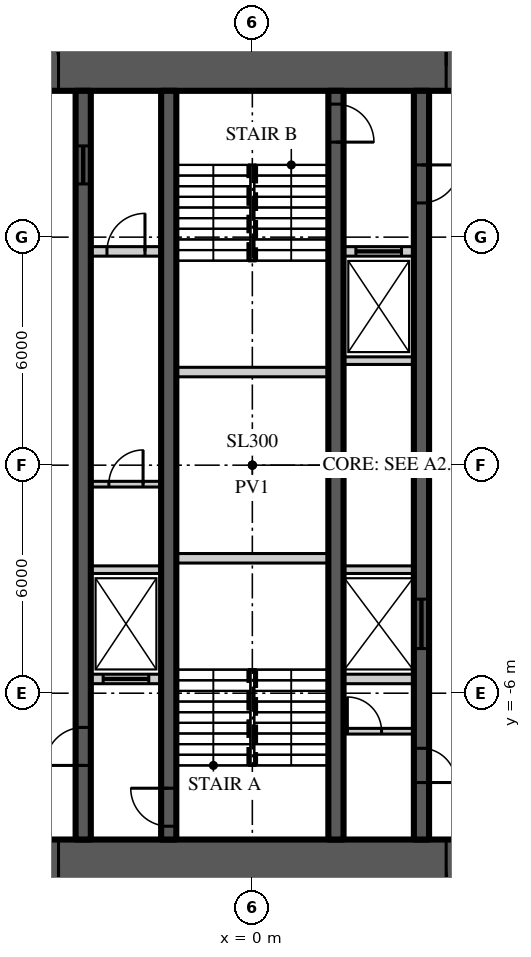
"""IFC4 building model, lengths in metres.
Left out: names, types, materials, properties, quantities, classifications, styles, units other than length and angle.
Written with IfcOpenShell. Run it as: python <this file> out.ifc"""

import sys

from ifc_helpers import new_model, si_unit, direction, frame, frame_2d, origin, place, context, subcontext, project, spatial, rectangle, extrude, element, fill, save


model = new_model("IFC4")
c1 = context("Model", 3, precision=1e-05, world=origin(), true_north=direction((0.0, 1.0)))
c2 = subcontext(c1, "Body", "Model", "MODEL_VIEW")
j1 = project(units=[si_unit("LENGTHUNIT", "METRE"), si_unit("PLANEANGLEUNIT", "RADIAN")], contexts=[c1])
p1 = place(None, origin())
s1 = spatial("IfcSite", under=j1, at=p1, CompositionType="ELEMENT")
p2 = place(p1, origin())
s2 = spatial("IfcBuilding", under=s1, at=p2, CompositionType="ELEMENT")
p3 = place(p2, origin())
s3 = spatial("IfcBuildingStorey", under=s2, at=p3, CompositionType="ELEMENT", Elevation=0.0)
p4 = place(p3, frame((-11.15, 10.5, 0.0), z_axis=(0.0, 0.0, 1.0), x_axis=(1.0, 0.0, 0.0)))
e1 = element("IfcWall", 1, at=p4, inside=s3, PredefinedType="SHEAR", context=c2, shape_type="SweptSolid", body=[
    extrude(rectangle(XDim=22.3, YDim=1.3, at=frame_2d((11.15, 0.0))), origin(), (0.0, 0.0, 1.0), 7.0),
])
p5 = place(p4, frame((4.25, 0.0, 0.0)))
e2 = element("IfcOpeningElement", 2, at=p5, cuts=e1, PredefinedType="OPENING", context=c2, shape_type="SweptSolid", body=[
    extrude(rectangle(XDim=1.8, YDim=2.2, at=frame_2d((0.9, 1.1))), frame((0.0, 0.66, 0.0), z_axis=(0.0, -1.0, 0.0), x_axis=(1.0, 0.0, 0.0)), (0.0, 0.0, 1.0), 1.32),
])
p6 = place(p4, frame((16.25, 0.0, 0.0)))
e3 = element("IfcOpeningElement", 3, at=p6, cuts=e1, PredefinedType="OPENING", context=c2, shape_type="SweptSolid", body=[
    extrude(rectangle(XDim=1.8, YDim=2.2, at=frame_2d((0.9, 1.1))), frame((0.0, 0.66, 0.0), z_axis=(0.0, -1.0, 0.0), x_axis=(1.0, 0.0, 0.0)), (0.0, 0.0, 1.0), 1.32),
])
p7 = place(p3, frame((11.15, -10.5, 0.0), z_axis=(0.0, 0.0, 1.0), x_axis=(-1.0, 0.0, 0.0)))
e4 = element("IfcWall", 4, at=p7, inside=s3, PredefinedType="SHEAR", context=c2, shape_type="SweptSolid", body=[
    extrude(rectangle(XDim=22.3, YDim=1.3, at=frame_2d((11.15, 0.0))), origin(), (0.0, 0.0, 1.0), 7.0),
])
p8 = place(p7, frame((16.25, 0.0, 0.0)))
e5 = element("IfcOpeningElement", 5, at=p8, cuts=e4, PredefinedType="OPENING", context=c2, shape_type="SweptSolid", body=[
    extrude(rectangle(XDim=1.8, YDim=2.2, at=frame_2d((0.9, 1.1))), frame((0.0, 0.66, 0.0), z_axis=(0.0, -1.0, 0.0), x_axis=(1.0, 0.0, 0.0)), (0.0, 0.0, 1.0), 1.32),
])
p9 = place(p7, frame((4.25, 0.0, 0.0)))
e6 = element("IfcOpeningElement", 6, at=p9, cuts=e4, PredefinedType="OPENING", context=c2, shape_type="SweptSolid", body=[
    extrude(rectangle(XDim=1.8, YDim=2.2, at=frame_2d((0.9, 1.1))), frame((0.0, 0.66, 0.0), z_axis=(0.0, -1.0, 0.0), x_axis=(1.0, 0.0, 0.0)), (0.0, 0.0, 1.0), 1.32),
])
p10 = place(p3, frame((-4.45, -9.85, 0.0), z_axis=(0.0, 0.0, 1.0), x_axis=(0.0, 1.0, 0.0)))
e7 = element("IfcWall", 7, at=p10, inside=s3, PredefinedType="SHEAR", context=c2, shape_type="SweptSolid", body=[
    extrude(rectangle(XDim=19.7, YDim=0.4, at=frame_2d((9.85, 0.0))), origin(), (0.0, 0.0, 1.0), 7.0),
])
p11 = place(p10, frame((1.95, 0.0, 0.0)))
e8 = element("IfcOpeningElement", 8, at=p11, cuts=e7, PredefinedType="OPENING", context=c2, shape_type="SweptSolid", body=[
    extrude(rectangle(XDim=1.0, YDim=2.2, at=frame_2d((0.5, 1.1))), frame((0.0, 0.21, 0.0), z_axis=(0.0, -1.0, 0.0), x_axis=(1.0, 0.0, 0.0)), (0.0, 0.0, 1.0), 0.42),
])
p12 = place(p10, frame((17.25, 0.0, 0.0)))
e9 = element("IfcOpeningElement", 9, at=p12, cuts=e7, PredefinedType="OPENING", context=c2, shape_type="SweptSolid", body=[
    extrude(rectangle(XDim=1.0, YDim=2.1, at=frame_2d((0.5, 1.05))), frame((0.0, 0.21, 0.0), z_axis=(0.0, -1.0, 0.0), x_axis=(1.0, 0.0, 0.0)), (0.0, 0.0, 1.0), 0.42),
])
p13 = place(p3, frame((4.45, 9.85, 0.0), z_axis=(0.0, 0.0, 1.0), x_axis=(0.0, -1.0, 0.0)))
e10 = element("IfcWall", 10, at=p13, inside=s3, PredefinedType="SHEAR", context=c2, shape_type="SweptSolid", body=[
    extrude(rectangle(XDim=19.7, YDim=0.4, at=frame_2d((9.85, 0.0))), origin(), (0.0, 0.0, 1.0), 7.0),
])
p14 = place(p13, frame((1.95, 0.0, 0.0)))
e11 = element("IfcOpeningElement", 11, at=p14, cuts=e10, PredefinedType="OPENING", context=c2, shape_type="SweptSolid", body=[
    extrude(rectangle(XDim=1.0, YDim=2.2, at=frame_2d((0.5, 1.1))), frame((0.0, 0.21, 0.0), z_axis=(0.0, -1.0, 0.0), x_axis=(1.0, 0.0, 0.0)), (0.0, 0.0, 1.0), 0.42),
])
p15 = place(p13, frame((17.3, 0.0, 0.0)))
e12 = element("IfcOpeningElement", 12, at=p15, cuts=e10, PredefinedType="OPENING", context=c2, shape_type="SweptSolid", body=[
    extrude(rectangle(XDim=0.9, YDim=2.1, at=frame_2d((0.45, 1.05))), frame((0.0, 0.21, 0.0), z_axis=(0.0, -1.0, 0.0), x_axis=(1.0, 0.0, 0.0)), (0.0, 0.0, 1.0), 0.42),
])
p16 = place(p13, frame((13.375, 0.0, 0.0)))
e13 = element("IfcOpeningElement", 13, at=p16, cuts=e10, PredefinedType="OPENING", context=c2, shape_type="SweptSolid", body=[
    extrude(rectangle(XDim=1.3, YDim=2.2, at=frame_2d((0.65, 1.1))), frame((0.0, 0.21, 0.0), z_axis=(0.0, -1.0, 0.0), x_axis=(1.0, 0.0, 0.0)), (0.0, 0.0, 1.0), 0.42),
])
p17 = place(p3, frame((-2.2, -9.85, 0.0), z_axis=(0.0, 0.0, 1.0), x_axis=(0.0, 1.0, 0.0)))
e14 = element("IfcWall", 14, at=p17, inside=s3, PredefinedType="SHEAR", context=c2, shape_type="SweptSolid", body=[
    extrude(rectangle(XDim=19.7, YDim=0.4, at=frame_2d((9.85, 0.0))), origin(), (0.0, 0.0, 1.0), 7.0),
])
p18 = place(p17, frame((0.35, 0.0, 0.0)))
e15 = element("IfcOpeningElement", 15, at=p18, cuts=e14, PredefinedType="OPENING", context=c2, shape_type="SweptSolid", body=[
    extrude(rectangle(XDim=1.0, YDim=2.2, at=frame_2d((0.5, 1.1))), frame((0.0, 0.21, 0.0), z_axis=(0.0, -1.0, 0.0), x_axis=(1.0, 0.0, 0.0)), (0.0, 0.0, 1.0), 0.42),
])
p19 = place(p3, frame((2.2, 9.85, 0.0), z_axis=(0.0, 0.0, 1.0), x_axis=(0.0, -1.0, 0.0)))
e16 = element("IfcWall", 16, at=p19, inside=s3, PredefinedType="SHEAR", context=c2, shape_type="SweptSolid", body=[
    extrude(rectangle(XDim=19.7, YDim=0.4, at=frame_2d((9.85, 0.0))), origin(), (0.0, 0.0, 1.0), 7.0),
])
p20 = place(p19, frame((0.35, 0.0, 0.0)))
e17 = element("IfcOpeningElement", 17, at=p20, cuts=e16, PredefinedType="OPENING", context=c2, shape_type="SweptSolid", body=[
    extrude(rectangle(XDim=1.0, YDim=2.2, at=frame_2d((0.5, 1.1))), frame((0.0, 0.21, 0.0), z_axis=(0.0, -1.0, 0.0), x_axis=(1.0, 0.0, 0.0)), (0.0, 0.0, 1.0), 0.42),
])
p21 = place(p3, frame((-4.25, 5.625, 0.0), z_axis=(0.0, 0.0, 1.0), x_axis=(1.0, 0.0, 0.0)))
e18 = element("IfcWall", 18, at=p21, inside=s3, PredefinedType="SOLIDWALL", context=c2, shape_type="SweptSolid", body=[
    extrude(rectangle(XDim=1.85, YDim=0.25, at=frame_2d((0.925, 0.0))), origin(), (0.0, 0.0, 1.0), 6.8),
])
p22 = place(p21, frame((0.425, 0.0, 0.0)))
e19 = element("IfcOpeningElement", 19, at=p22, cuts=e18, PredefinedType="OPENING", context=c2, shape_type="SweptSolid", body=[
    extrude(rectangle(XDim=1.0, YDim=2.2, at=frame_2d((0.5, 1.1))), frame((0.0, 0.135, 0.0), z_axis=(0.0, -1.0, 0.0), x_axis=(1.0, 0.0, 0.0)), (0.0, 0.0, 1.0), 0.27),
])
p23 = place(p3, frame((2.4, 5.625, 0.0), z_axis=(0.0, 0.0, 1.0), x_axis=(1.0, 0.0, 0.0)))
e20 = element("IfcWall", 20, at=p23, inside=s3, PredefinedType="SOLIDWALL", context=c2, shape_type="SweptSolid", body=[
    extrude(rectangle(XDim=1.85, YDim=0.25, at=frame_2d((0.925, 0.0))), origin(), (0.0, 0.0, 1.0), 6.8),
])
p24 = place(p23, frame((0.325, 0.0, 0.0)))
e21 = element("IfcOpeningElement", 21, at=p24, cuts=e20, PredefinedType="OPENING", context=c2, shape_type="SweptSolid", body=[
    extrude(rectangle(XDim=1.2, YDim=2.2, at=frame_2d((0.6, 1.1))), frame((0.0, 0.135, 0.0), z_axis=(0.0, -1.0, 0.0), x_axis=(1.0, 0.0, 0.0)), (0.0, 0.0, 1.0), 0.27),
])
p25 = place(p3, frame((-4.25, -5.625, 0.0), z_axis=(0.0, 0.0, 1.0), x_axis=(1.0, 0.0, 0.0)))
e22 = element("IfcWall", 22, at=p25, inside=s3, PredefinedType="SOLIDWALL", context=c2, shape_type="SweptSolid", body=[
    extrude(rectangle(XDim=1.85, YDim=0.25, at=frame_2d((0.925, 0.0))), origin(), (0.0, 0.0, 1.0), 6.8),
])
p26 = place(p25, frame((0.325, 0.0, 0.0)))
e23 = element("IfcOpeningElement", 23, at=p26, cuts=e22, PredefinedType="OPENING", context=c2, shape_type="SweptSolid", body=[
    extrude(rectangle(XDim=1.2, YDim=2.2, at=frame_2d((0.6, 1.1))), frame((0.0, 0.135, 0.0), z_axis=(0.0, -1.0, 0.0), x_axis=(1.0, 0.0, 0.0)), (0.0, 0.0, 1.0), 0.27),
])
p27 = place(p3, frame((2.4, -5.625, 0.0), z_axis=(0.0, 0.0, 1.0), x_axis=(1.0, 0.0, 0.0)))
e24 = element("IfcWall", 24, at=p27, inside=s3, PredefinedType="SOLIDWALL", context=c2, shape_type="SweptSolid", body=[
    extrude(rectangle(XDim=1.85, YDim=0.25, at=frame_2d((0.925, 0.0))), origin(), (0.0, 0.0, 1.0), 6.8),
])
for number, where, z_axis, x_axis in (
    (25, (-2.0, -2.45, 0.0), (0.0, 0.0, 1.0), (1.0, 0.0, 0.0)),
    (26, (-2.0, 2.45, 0.0), (0.0, 0.0, 1.0), (1.0, 0.0, 0.0)),
):
    element("IfcWall", number, at=place(p3, frame(where, z_axis=z_axis, x_axis=x_axis)), inside=s3, PredefinedType="SOLIDWALL", context=c2, shape_type="SweptSolid", body=[
        extrude(rectangle(XDim=4.0, YDim=0.25, at=frame_2d((2.0, 0.0))), origin(), (0.0, 0.0, 1.0), 6.8),
    ])
for number, where, z_axis, x_axis in (
    (27, (-4.25, -2.75, 0.0), (0.0, 0.0, 1.0), (1.0, 0.0, 0.0)),
    (28, (2.4, -2.75, 0.0), (0.0, 0.0, 1.0), (1.0, 0.0, 0.0)),
    (29, (2.4, 2.75, 0.0), (0.0, 0.0, 1.0), (1.0, 0.0, 0.0)),
):
    element("IfcWall", number, at=place(p3, frame(where, z_axis=z_axis, x_axis=x_axis)), inside=s3, PredefinedType="SOLIDWALL", context=c2, shape_type="SweptSolid", body=[
        extrude(rectangle(XDim=1.85, YDim=0.2, at=frame_2d((0.925, 0.0))), origin(), (0.0, 0.0, 1.0), 6.8),
    ])
p28 = place(p3, frame((-4.25, -0.5, 0.0), z_axis=(0.0, 0.0, 1.0), x_axis=(1.0, 0.0, 0.0)))
e30 = element("IfcWall", 30, at=p28, inside=s3, PredefinedType="SOLIDWALL", context=c2, shape_type="SweptSolid", body=[
    extrude(rectangle(XDim=1.85, YDim=0.15, at=frame_2d((0.925, 0.0))), origin(), (0.0, 0.0, 1.0), 6.75),
])
p29 = place(p28, frame((0.475, 0.0, 0.0)))
e31 = element("IfcOpeningElement", 31, at=p29, cuts=e30, PredefinedType="OPENING", context=c2, shape_type="SweptSolid", body=[
    extrude(rectangle(XDim=0.9, YDim=2.1, at=frame_2d((0.45, 1.05))), frame((0.0, 0.085, 0.0), z_axis=(0.0, -1.0, 0.0), x_axis=(1.0, 0.0, 0.0)), (0.0, 0.0, 1.0), 0.17),
])
p30 = place(p3, frame((2.4, -7.0, 0.0), z_axis=(0.0, 0.0, 1.0), x_axis=(1.0, 0.0, 0.0)))
e32 = element("IfcWall", 32, at=p30, inside=s3, PredefinedType="SOLIDWALL", context=c2, shape_type="SweptSolid", body=[
    extrude(rectangle(XDim=1.85, YDim=0.15, at=frame_2d((0.925, 0.0))), origin(), (0.0, 0.0, 1.0), 6.75),
])
p31 = place(p30, frame((0.1, 0.0, 0.0)))
e33 = element("IfcOpeningElement", 33, at=p31, cuts=e32, PredefinedType="OPENING", context=c2, shape_type="SweptSolid", body=[
    extrude(rectangle(XDim=0.9, YDim=2.1, at=frame_2d((0.45, 1.05))), frame((0.0, 0.085, 0.0), z_axis=(0.0, -1.0, 0.0), x_axis=(1.0, 0.0, 0.0)), (0.0, 0.0, 1.0), 0.17),
])
p32 = place(p5, origin())
e34 = element("IfcDoor", 34, at=p32, inside=s3, OperationType="DOUBLE_DOOR_DOUBLE_SWING", PredefinedType="DOOR", context=c2, shape_type="SweptSolid", body=[
    extrude(rectangle(XDim=1.8, YDim=2.2, at=frame_2d((0.9, 1.1))), frame((0.0, 0.025, 0.0), z_axis=(0.0, -1.0, 0.0), x_axis=(1.0, 0.0, 0.0)), (0.0, 0.0, 1.0), 0.05),
])
fill(e2, e34)
p33 = place(p8, origin())
e35 = element("IfcDoor", 35, at=p33, inside=s3, OperationType="DOUBLE_DOOR_DOUBLE_SWING", PredefinedType="DOOR", context=c2, shape_type="SweptSolid", body=[
    extrude(rectangle(XDim=1.8, YDim=2.2, at=frame_2d((0.9, 1.1))), frame((0.0, 0.025, 0.0), z_axis=(0.0, -1.0, 0.0), x_axis=(1.0, 0.0, 0.0)), (0.0, 0.0, 1.0), 0.05),
])
fill(e5, e35)
p34 = place(p6, origin())
e36 = element("IfcDoor", 36, at=p34, inside=s3, OperationType="DOUBLE_DOOR_DOUBLE_SWING", PredefinedType="DOOR", context=c2, shape_type="SweptSolid", body=[
    extrude(rectangle(XDim=1.8, YDim=2.2, at=frame_2d((0.9, 1.1))), frame((0.0, 0.025, 0.0), z_axis=(0.0, -1.0, 0.0), x_axis=(1.0, 0.0, 0.0)), (0.0, 0.0, 1.0), 0.05),
])
fill(e3, e36)
p35 = place(p9, origin())
e37 = element("IfcDoor", 37, at=p35, inside=s3, OperationType="DOUBLE_DOOR_DOUBLE_SWING", PredefinedType="DOOR", context=c2, shape_type="SweptSolid", body=[
    extrude(rectangle(XDim=1.8, YDim=2.2, at=frame_2d((0.9, 1.1))), frame((0.0, 0.025, 0.0), z_axis=(0.0, -1.0, 0.0), x_axis=(1.0, 0.0, 0.0)), (0.0, 0.0, 1.0), 0.05),
])
fill(e6, e37)
p36 = place(p11, origin())
e38 = element("IfcDoor", 38, at=p36, inside=s3, OperationType="SINGLE_SWING_LEFT", PredefinedType="DOOR", context=c2, shape_type="SweptSolid", body=[
    extrude(rectangle(XDim=1.0, YDim=2.2, at=frame_2d((0.5, 1.1))), frame((0.0, 0.025, 0.0), z_axis=(0.0, -1.0, 0.0), x_axis=(1.0, 0.0, 0.0)), (0.0, 0.0, 1.0), 0.05),
])
fill(e8, e38)
p37 = place(p18, origin())
e39 = element("IfcDoor", 39, at=p37, inside=s3, OperationType="SINGLE_SWING_RIGHT", PredefinedType="DOOR", context=c2, shape_type="SweptSolid", body=[
    extrude(rectangle(XDim=1.0, YDim=2.2, at=frame_2d((0.5, 1.1))), frame((0.0, 0.025, 0.0), z_axis=(0.0, -1.0, 0.0), x_axis=(1.0, 0.0, 0.0)), (0.0, 0.0, 1.0), 0.05),
])
fill(e15, e39)
p38 = place(p14, origin())
e40 = element("IfcDoor", 40, at=p38, inside=s3, OperationType="SINGLE_SWING_LEFT", PredefinedType="DOOR", context=c2, shape_type="SweptSolid", body=[
    extrude(rectangle(XDim=1.0, YDim=2.2, at=frame_2d((0.5, 1.1))), frame((0.0, 0.025, 0.0), z_axis=(0.0, -1.0, 0.0), x_axis=(1.0, 0.0, 0.0)), (0.0, 0.0, 1.0), 0.05),
])
fill(e11, e40)
p39 = place(p20, origin())
e41 = element("IfcDoor", 41, at=p39, inside=s3, OperationType="SINGLE_SWING_RIGHT", PredefinedType="DOOR", context=c2, shape_type="SweptSolid", body=[
    extrude(rectangle(XDim=1.0, YDim=2.2, at=frame_2d((0.5, 1.1))), frame((0.0, 0.025, 0.0), z_axis=(0.0, -1.0, 0.0), x_axis=(1.0, 0.0, 0.0)), (0.0, 0.0, 1.0), 0.05),
])
fill(e17, e41)
p40 = place(p12, origin())
e42 = element("IfcDoor", 42, at=p40, inside=s3, OperationType="SLIDING_TO_LEFT", PredefinedType="DOOR", context=c2, shape_type="SweptSolid", body=[
    extrude(rectangle(XDim=1.0, YDim=2.1, at=frame_2d((0.5, 1.05))), frame((0.0, 0.025, 0.0), z_axis=(0.0, -1.0, 0.0), x_axis=(1.0, 0.0, 0.0)), (0.0, 0.0, 1.0), 0.05),
])
fill(e9, e42)
p41 = place(p15, origin())
e43 = element("IfcDoor", 43, at=p41, inside=s3, OperationType="SINGLE_SWING_RIGHT", PredefinedType="DOOR", context=c2, shape_type="SweptSolid", body=[
    extrude(rectangle(XDim=0.9, YDim=2.1, at=frame_2d((0.45, 1.05))), frame((0.0, 0.025, 0.0), z_axis=(0.0, -1.0, 0.0), x_axis=(1.0, 0.0, 0.0)), (0.0, 0.0, 1.0), 0.05),
])
fill(e12, e43)
p42 = place(p16, origin())
e44 = element("IfcDoor", 44, at=p42, inside=s3, OperationType="SLIDING_TO_LEFT", PredefinedType="DOOR", context=c2, shape_type="SweptSolid", body=[
    extrude(rectangle(XDim=1.3, YDim=2.2, at=frame_2d((0.65, 1.1))), frame((0.0, 0.025, 0.0), z_axis=(0.0, -1.0, 0.0), x_axis=(1.0, 0.0, 0.0)), (0.0, 0.0, 1.0), 0.05),
])
fill(e13, e44)
p43 = place(p26, origin())
e45 = element("IfcDoor", 45, at=p43, inside=s3, OperationType="SLIDING_TO_LEFT", PredefinedType="DOOR", context=c2, shape_type="SweptSolid", body=[
    extrude(rectangle(XDim=1.2, YDim=2.2, at=frame_2d((0.6, 1.1))), frame((0.0, 0.025, 0.0), z_axis=(0.0, -1.0, 0.0), x_axis=(1.0, 0.0, 0.0)), (0.0, 0.0, 1.0), 0.05),
])
fill(e23, e45)
p44 = place(p24, origin())
e46 = element("IfcDoor", 46, at=p44, inside=s3, OperationType="SLIDING_TO_LEFT", PredefinedType="DOOR", context=c2, shape_type="SweptSolid", body=[
    extrude(rectangle(XDim=1.2, YDim=2.2, at=frame_2d((0.6, 1.1))), frame((0.0, 0.025, 0.0), z_axis=(0.0, -1.0, 0.0), x_axis=(1.0, 0.0, 0.0)), (0.0, 0.0, 1.0), 0.05),
])
fill(e21, e46)
p45 = place(p29, origin())
e47 = element("IfcDoor", 47, at=p45, inside=s3, OperationType="SINGLE_SWING_RIGHT", PredefinedType="DOOR", context=c2, shape_type="SweptSolid", body=[
    extrude(rectangle(XDim=0.9, YDim=2.1, at=frame_2d((0.45, 1.05))), frame((0.0, 0.025, 0.0), z_axis=(0.0, -1.0, 0.0), x_axis=(1.0, 0.0, 0.0)), (0.0, 0.0, 1.0), 0.05),
])
fill(e31, e47)
p46 = place(p22, origin())
e48 = element("IfcDoor", 48, at=p46, inside=s3, OperationType="SINGLE_SWING_RIGHT", PredefinedType="DOOR", context=c2, shape_type="SweptSolid", body=[
    extrude(rectangle(XDim=1.0, YDim=2.2, at=frame_2d((0.5, 1.1))), frame((0.0, 0.025, 0.0), z_axis=(0.0, -1.0, 0.0), x_axis=(1.0, 0.0, 0.0)), (0.0, 0.0, 1.0), 0.05),
])
fill(e19, e48)
p47 = place(p31, origin())
e49 = element("IfcDoor", 49, at=p47, inside=s3, OperationType="SINGLE_SWING_LEFT", PredefinedType="DOOR", context=c2, shape_type="SweptSolid", body=[
    extrude(rectangle(XDim=0.9, YDim=2.1, at=frame_2d((0.45, 1.05))), frame((0.0, 0.025, 0.0), z_axis=(0.0, -1.0, 0.0), x_axis=(1.0, 0.0, 0.0)), (0.0, 0.0, 1.0), 0.05),
])
fill(e33, e49)
save(model, sys.argv[1])
